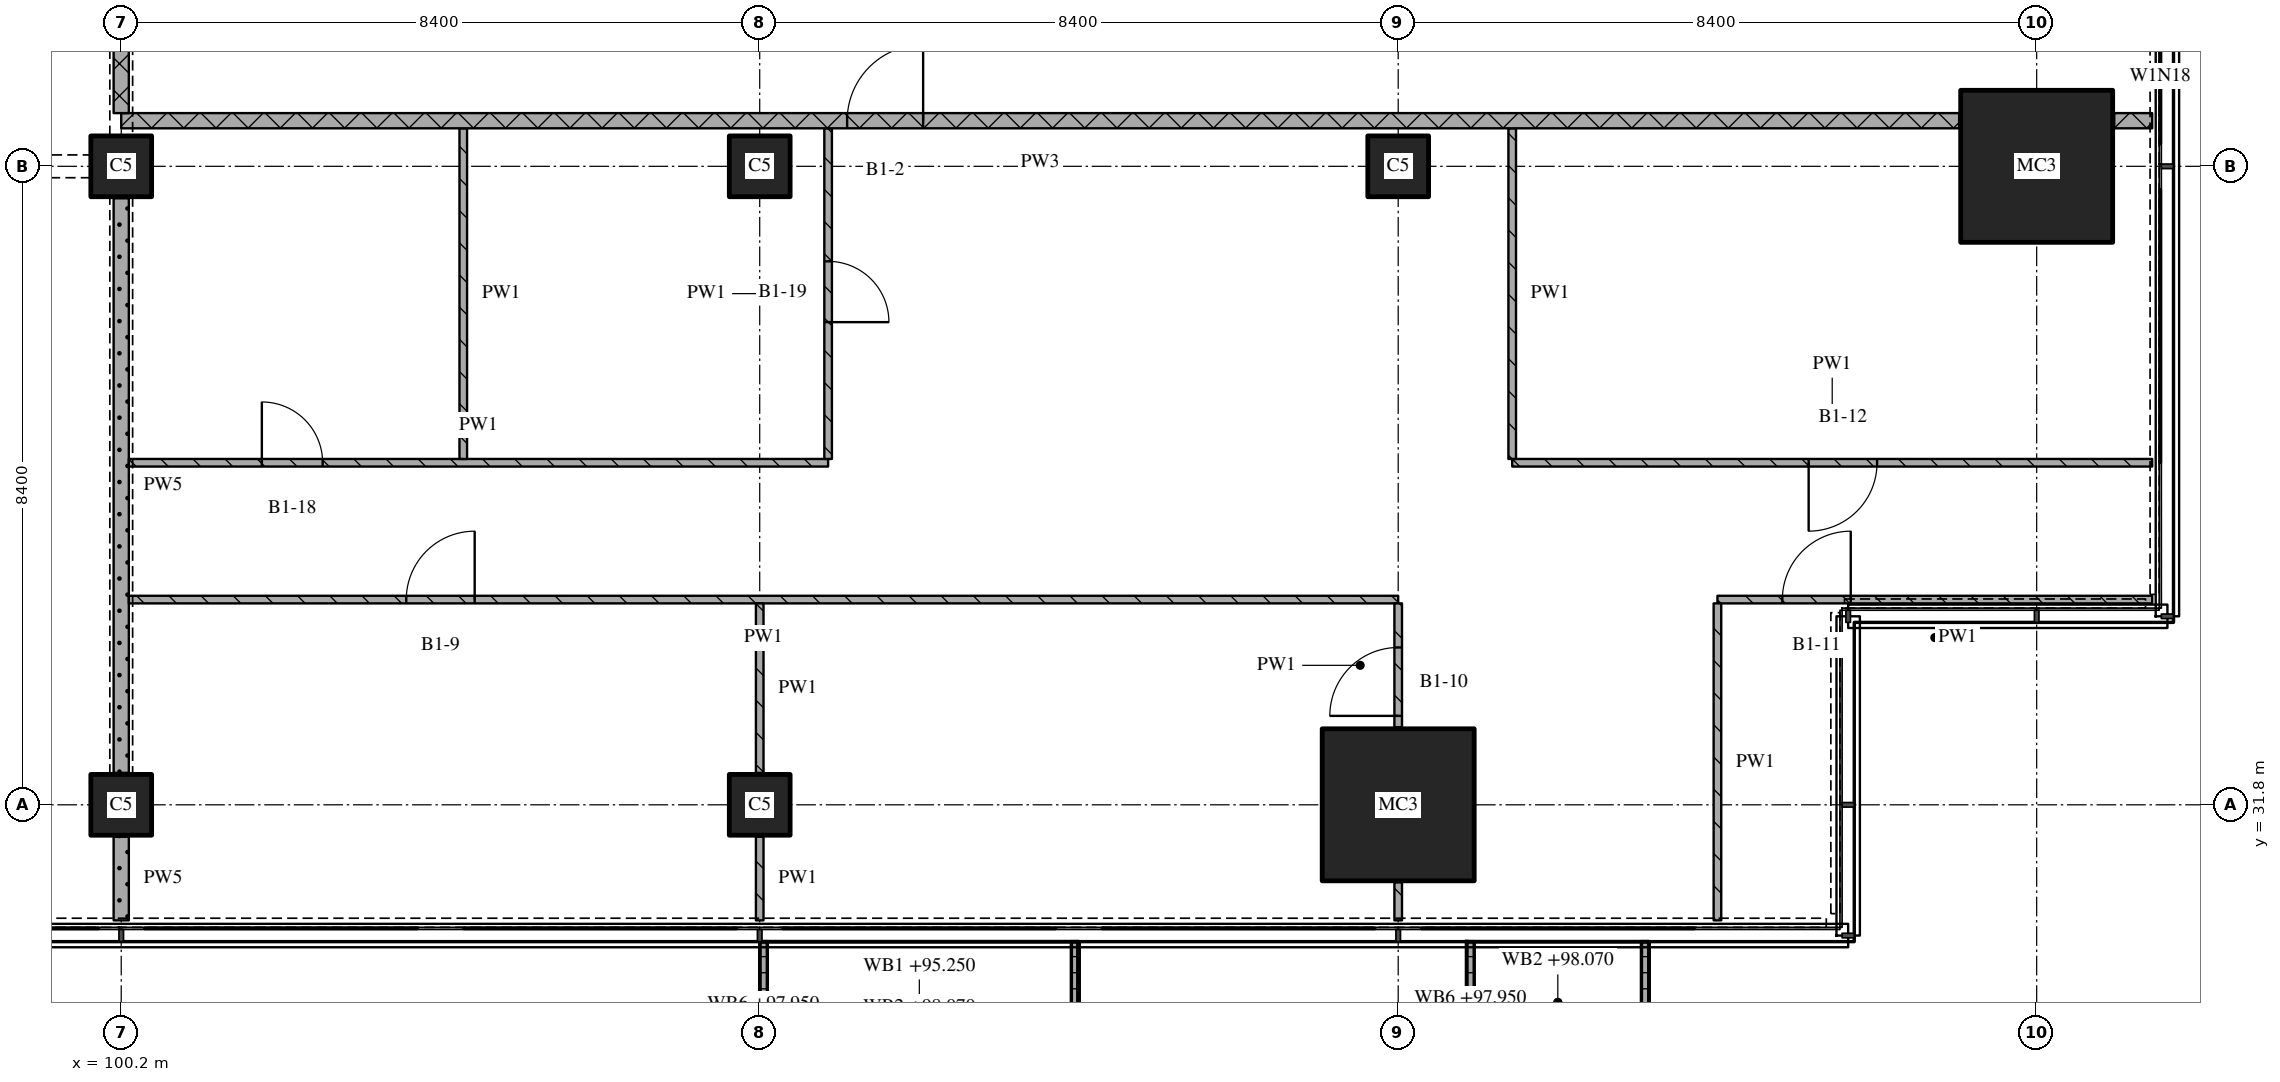
"""IFC4 building model, lengths in metres.
Left out: names, types, materials, properties, quantities, classifications, styles, units other than length and angle.
Written with IfcOpenShell. Run it as: python <this file> out.ifc"""

import sys

from ifc_helpers import new_model, si_unit, direction, frame, frame_2d, origin, origin_2d, place, context, subcontext, project, spatial, polyline, rectangle, outline, extrude, element, fill, save


model = new_model("IFC4")
c1 = context("Model", 3, precision=1e-05, world=origin(), true_north=direction((0.0, 1.0)))
c2 = subcontext(c1, "Body", "Model", "MODEL_VIEW")
j1 = project(units=[si_unit("LENGTHUNIT", "METRE"), si_unit("PLANEANGLEUNIT", "RADIAN")], contexts=[c1])
p1 = place(None, origin())
s1 = spatial("IfcSite", under=j1, at=p1, CompositionType="ELEMENT")
p2 = place(p1, origin())
s2 = spatial("IfcBuilding", under=s1, at=p2, CompositionType="ELEMENT")
p3 = place(p2, frame((0.0, 0.0, 95.25)))
s3 = spatial("IfcBuildingStorey", under=s2, at=p3, CompositionType="ELEMENT", Elevation=95.25)
for number, where, z_axis, x_axis in (
    (1, (100.2, 31.8, 0.0), (0.0, 0.0, 1.0), (1.0, 0.0, 0.0)),
    (2, (100.2, 40.2, 0.0), (0.0, 0.0, 1.0), (1.0, 0.0, 0.0)),
    (3, (108.6, 31.8, 0.0), (0.0, 0.0, 1.0), (1.0, 0.0, 0.0)),
    (4, (108.6, 40.2, 0.0), (0.0, 0.0, 1.0), (1.0, 0.0, 0.0)),
):
    element("IfcColumn", number, at=place(p3, frame(where, z_axis=z_axis, x_axis=x_axis)), inside=s3, PredefinedType="COLUMN", context=c2, shape_type="SweptSolid", body=[
        extrude(rectangle(XDim=0.8, YDim=0.8, at=origin_2d()), origin(), (0.0, 0.0, 1.0), 3.6),
    ])
p4 = place(p3, frame((117.0, 31.8, 0.0), z_axis=(0.0, 0.0, 1.0), x_axis=(1.0, 0.0, 0.0)))
e5 = element("IfcColumn", 5, at=p4, inside=s3, PredefinedType="COLUMN", context=c2, shape_type="SweptSolid", body=[
    extrude(rectangle(XDim=2.0, YDim=2.0, at=origin_2d()), origin(), (0.0, 0.0, 1.0), 3.6),
])
p5 = place(p3, frame((117.0, 40.2, 0.0), z_axis=(0.0, 0.0, 1.0), x_axis=(1.0, 0.0, 0.0)))
e6 = element("IfcColumn", 6, at=p5, inside=s3, PredefinedType="COLUMN", context=c2, shape_type="SweptSolid", body=[
    extrude(rectangle(XDim=0.8, YDim=0.8, at=origin_2d()), origin(), (0.0, 0.0, 1.0), 3.6),
])
p6 = place(p3, frame((125.4, 40.2, 0.0), z_axis=(0.0, 0.0, 1.0), x_axis=(1.0, 0.0, 0.0)))
e7 = element("IfcColumn", 7, at=p6, inside=s3, PredefinedType="COLUMN", context=c2, shape_type="SweptSolid", body=[
    extrude(rectangle(XDim=2.0, YDim=2.0, at=origin_2d()), origin(), (0.0, 0.0, 1.0), 3.6),
])
p7 = place(p3, origin())
e8 = element("IfcWall", 8, at=p7, inside=s3, PredefinedType="SOLIDWALL", context=c2, shape_type="SweptSolid", body=[
    extrude(outline(polyline([(108.6, 30.0), (108.7, 30.0), (108.7, 28.367), (112.7, 28.367), (112.7, 30.0), (112.8, 30.0), (112.8, 28.267), (108.6, 28.267), (108.6, 30.0)])), origin(), (0.0, 0.0, 1.0), 1.0),
])
p8 = place(p3, origin())
e9 = element("IfcWall", 9, at=p8, inside=s3, PredefinedType="SOLIDWALL", context=c2, shape_type="SweptSolid", body=[
    extrude(outline(polyline([(117.9, 30.0), (118.0, 30.0), (118.0, 28.5), (120.2, 28.5), (120.2, 30.0), (120.3, 30.0), (120.3, 28.4), (117.9, 28.4), (117.9, 30.0)])), origin(), (0.0, 0.0, 1.0), 1.0),
])
p9 = place(p3, frame((117.0, 34.5, 0.0), z_axis=(0.0, 0.0, 1.0), x_axis=(-1.0, 0.0, 0.0)))
e10 = element("IfcWall", 10, at=p9, inside=s3, PredefinedType="PARTITIONING", context=c2, shape_type="SweptSolid", body=[
    extrude(rectangle(XDim=16.7, YDim=0.1, at=frame_2d((8.35, 0.0))), origin(), (0.0, 0.0, 1.0), 3.32),
])
p10 = place(p9, frame((12.15, 0.0, 0.0)))
e11 = element("IfcOpeningElement", 11, at=p10, cuts=e10, PredefinedType="OPENING", context=c2, shape_type="SweptSolid", body=[
    extrude(rectangle(XDim=0.9, YDim=2.1, at=frame_2d((0.45, 1.05))), frame((0.0, 0.06, 0.0), z_axis=(0.0, -1.0, 0.0), x_axis=(1.0, 0.0, 0.0)), (0.0, 0.0, 1.0), 0.12),
])
p11 = place(p3, frame((126.92, 34.5, 0.0), z_axis=(0.0, 0.0, 1.0), x_axis=(-1.0, 0.0, 0.0)))
e12 = element("IfcWall", 12, at=p11, inside=s3, PredefinedType="PARTITIONING", context=c2, shape_type="SweptSolid", body=[
    extrude(rectangle(XDim=5.72, YDim=0.1, at=frame_2d((2.86, 0.0))), origin(), (0.0, 0.0, 1.0), 3.32),
])
p12 = place(p11, frame((3.966, 0.0, 0.0)))
e13 = element("IfcOpeningElement", 13, at=p12, cuts=e12, PredefinedType="OPENING", context=c2, shape_type="SweptSolid", body=[
    extrude(rectangle(XDim=0.9, YDim=2.1, at=frame_2d((0.45, 1.05))), frame((0.0, 0.06, 0.0), z_axis=(0.0, -1.0, 0.0), x_axis=(1.0, 0.0, 0.0)), (0.0, 0.0, 1.0), 0.12),
])
p13 = place(p3, frame((100.3, 36.3, 0.0), z_axis=(0.0, 0.0, 1.0), x_axis=(1.0, 0.0, 0.0)))
e14 = element("IfcWall", 14, at=p13, inside=s3, PredefinedType="PARTITIONING", context=c2, shape_type="SweptSolid", body=[
    extrude(rectangle(XDim=9.2, YDim=0.1, at=frame_2d((4.6, 0.0))), origin(), (0.0, 0.0, 1.0), 3.32),
])
p14 = place(p13, frame((1.75, 0.0, 0.0)))
e15 = element("IfcOpeningElement", 15, at=p14, cuts=e14, PredefinedType="OPENING", context=c2, shape_type="SweptSolid", body=[
    extrude(rectangle(XDim=0.8, YDim=2.1, at=frame_2d((0.4, 1.05))), frame((0.0, 0.06, 0.0), z_axis=(0.0, -1.0, 0.0), x_axis=(1.0, 0.0, 0.0)), (0.0, 0.0, 1.0), 0.12),
])
p15 = place(p3, frame((118.5, 36.3, 0.0), z_axis=(0.0, 0.0, 1.0), x_axis=(1.0, 0.0, 0.0)))
e16 = element("IfcWall", 16, at=p15, inside=s3, PredefinedType="PARTITIONING", context=c2, shape_type="SweptSolid", body=[
    extrude(rectangle(XDim=8.42, YDim=0.1, at=frame_2d((4.21, 0.0))), origin(), (0.0, 0.0, 1.0), 3.32),
])
p16 = place(p15, frame((3.9, 0.0, 0.0)))
e17 = element("IfcOpeningElement", 17, at=p16, cuts=e16, PredefinedType="OPENING", context=c2, shape_type="SweptSolid", body=[
    extrude(rectangle(XDim=0.9, YDim=2.1, at=frame_2d((0.45, 1.05))), frame((0.0, 0.06, 0.0), z_axis=(0.0, -1.0, 0.0), x_axis=(1.0, 0.0, 0.0)), (0.0, 0.0, 1.0), 0.12),
])
p17 = place(p3, frame((124.38, 40.8, 0.0), z_axis=(0.0, 0.0, 1.0), x_axis=(-1.0, 0.0, 0.0)))
e18 = element("IfcWall", 18, at=p17, inside=s3, PredefinedType="PARTITIONING", context=c2, shape_type="SweptSolid", body=[
    extrude(rectangle(XDim=24.18, YDim=0.2, at=frame_2d((12.09, 0.0))), origin(), (0.0, 0.0, 1.0), 3.32),
])
p18 = place(p17, frame((13.63, 0.0, 0.0)))
e19 = element("IfcOpeningElement", 19, at=p18, cuts=e18, PredefinedType="OPENING", context=c2, shape_type="SweptSolid", body=[
    extrude(rectangle(XDim=1.0, YDim=2.1, at=frame_2d((0.5, 1.05))), frame((0.0, 0.11, 0.0), z_axis=(0.0, -1.0, 0.0), x_axis=(1.0, 0.0, 0.0)), (0.0, 0.0, 1.0), 0.22),
])
p19 = place(p3, frame((126.42, 40.8, 0.0), z_axis=(0.0, 0.0, 1.0), x_axis=(1.0, 0.0, 0.0)))
e20 = element("IfcWall", 20, at=p19, inside=s3, PredefinedType="PARTITIONING", context=c2, shape_type="SweptSolid", body=[
    extrude(rectangle(XDim=0.5, YDim=0.2, at=frame_2d((0.25, 0.0))), origin(), (0.0, 0.0, 1.0), 3.32),
])
p20 = place(p3, frame((100.2, 43.1, 0.0), z_axis=(0.0, 0.0, 1.0), x_axis=(0.0, -1.0, 0.0)))
e21 = element("IfcWall", 21, at=p20, inside=s3, PredefinedType="PARTITIONING", context=c2, shape_type="SweptSolid", body=[
    extrude(rectangle(XDim=2.2, YDim=0.2, at=frame_2d((1.1, 0.0))), origin(), (0.0, 0.0, 1.0), 2.43),
])
p21 = place(p3, frame((100.2, 31.38, 0.0), z_axis=(0.0, 0.0, 1.0), x_axis=(0.0, -1.0, 0.0)))
e22 = element("IfcWall", 22, at=p21, inside=s3, PredefinedType="PARTITIONING", context=c2, shape_type="SweptSolid", body=[
    extrude(rectangle(XDim=1.1, YDim=0.2, at=frame_2d((0.55, 0.0))), origin(), (0.0, 0.0, 1.0), 3.32),
])
p22 = place(p3, frame((100.2, 39.78, 0.0), z_axis=(0.0, 0.0, 1.0), x_axis=(0.0, -1.0, 0.0)))
e23 = element("IfcWall", 23, at=p22, inside=s3, PredefinedType="PARTITIONING", context=c2, shape_type="SweptSolid", body=[
    extrude(rectangle(XDim=7.56, YDim=0.2, at=frame_2d((3.78, 0.0))), origin(), (0.0, 0.0, 1.0), 2.83),
])
p23 = place(p3, frame((104.7, 40.7, 0.0), z_axis=(0.0, 0.0, 1.0), x_axis=(0.0, -1.0, 0.0)))
e24 = element("IfcWall", 24, at=p23, inside=s3, PredefinedType="PARTITIONING", context=c2, shape_type="SweptSolid", body=[
    extrude(rectangle(XDim=4.35, YDim=0.1, at=frame_2d((2.175, 0.0))), origin(), (0.0, 0.0, 1.0), 3.32),
])
p24 = place(p3, frame((108.6, 31.38, 0.0), z_axis=(0.0, 0.0, 1.0), x_axis=(0.0, -1.0, 0.0)))
e25 = element("IfcWall", 25, at=p24, inside=s3, PredefinedType="PARTITIONING", context=c2, shape_type="SweptSolid", body=[
    extrude(rectangle(XDim=1.1, YDim=0.1, at=frame_2d((0.55, 0.0))), origin(), (0.0, 0.0, 1.0), 3.32),
])
p25 = place(p3, frame((108.6, 34.45, 0.0), z_axis=(0.0, 0.0, 1.0), x_axis=(0.0, -1.0, 0.0)))
e26 = element("IfcWall", 26, at=p25, inside=s3, PredefinedType="PARTITIONING", context=c2, shape_type="SweptSolid", body=[
    extrude(rectangle(XDim=2.23, YDim=0.1, at=frame_2d((1.115, 0.0))), origin(), (0.0, 0.0, 1.0), 3.32),
])
p26 = place(p3, frame((109.5, 36.35, 0.0), z_axis=(0.0, 0.0, 1.0), x_axis=(0.0, 1.0, 0.0)))
e27 = element("IfcWall", 27, at=p26, inside=s3, PredefinedType="PARTITIONING", context=c2, shape_type="SweptSolid", body=[
    extrude(rectangle(XDim=4.35, YDim=0.1, at=frame_2d((2.175, 0.0))), origin(), (0.0, 0.0, 1.0), 3.32),
])
p27 = place(p26, frame((1.8, 0.0, 0.0)))
e28 = element("IfcOpeningElement", 28, at=p27, cuts=e27, PredefinedType="OPENING", context=c2, shape_type="SweptSolid", body=[
    extrude(rectangle(XDim=0.8, YDim=2.1, at=frame_2d((0.4, 1.05))), frame((0.0, 0.06, 0.0), z_axis=(0.0, -1.0, 0.0), x_axis=(1.0, 0.0, 0.0)), (0.0, 0.0, 1.0), 0.12),
])
p28 = place(p3, frame((117.0, 30.78, 0.0), z_axis=(0.0, 0.0, 1.0), x_axis=(0.0, -1.0, 0.0)))
e29 = element("IfcWall", 29, at=p28, inside=s3, PredefinedType="PARTITIONING", context=c2, shape_type="SweptSolid", body=[
    extrude(rectangle(XDim=0.5, YDim=0.1, at=frame_2d((0.25, 0.0))), origin(), (0.0, 0.0, 1.0), 3.32),
])
p29 = place(p3, frame((117.0, 32.82, 0.0), z_axis=(0.0, 0.0, 1.0), x_axis=(0.0, 1.0, 0.0)))
e30 = element("IfcWall", 30, at=p29, inside=s3, PredefinedType="PARTITIONING", context=c2, shape_type="SweptSolid", body=[
    extrude(rectangle(XDim=1.63, YDim=0.1, at=frame_2d((0.815, 0.0))), origin(), (0.0, 0.0, 1.0), 3.32),
])
p30 = place(p29, frame((0.15, 0.0, 0.0)))
e31 = element("IfcOpeningElement", 31, at=p30, cuts=e30, PredefinedType="OPENING", context=c2, shape_type="SweptSolid", body=[
    extrude(rectangle(XDim=0.9, YDim=2.1, at=frame_2d((0.45, 1.05))), frame((0.0, 0.06, 0.0), z_axis=(0.0, -1.0, 0.0), x_axis=(1.0, 0.0, 0.0)), (0.0, 0.0, 1.0), 0.12),
])
p31 = place(p3, frame((118.5, 40.7, 0.0), z_axis=(0.0, 0.0, 1.0), x_axis=(0.0, -1.0, 0.0)))
e32 = element("IfcWall", 32, at=p31, inside=s3, PredefinedType="PARTITIONING", context=c2, shape_type="SweptSolid", body=[
    extrude(rectangle(XDim=4.35, YDim=0.1, at=frame_2d((2.175, 0.0))), origin(), (0.0, 0.0, 1.0), 3.32),
])
p32 = place(p3, frame((121.2, 34.45, 0.0), z_axis=(0.0, 0.0, 1.0), x_axis=(0.0, -1.0, 0.0)))
e33 = element("IfcWall", 33, at=p32, inside=s3, PredefinedType="PARTITIONING", context=c2, shape_type="SweptSolid", body=[
    extrude(rectangle(XDim=4.17, YDim=0.1, at=frame_2d((2.085, 0.0))), origin(), (0.0, 0.0, 1.0), 3.32),
])
p33 = place(p10, origin())
e34 = element("IfcDoor", 34, at=p33, inside=s3, OperationType="SINGLE_SWING_RIGHT", PredefinedType="DOOR", context=c2, shape_type="SweptSolid", body=[
    extrude(rectangle(XDim=0.9, YDim=2.1, at=frame_2d((0.45, 1.05))), frame((0.0, 0.025, 0.0), z_axis=(0.0, -1.0, 0.0), x_axis=(1.0, 0.0, 0.0)), (0.0, 0.0, 1.0), 0.05),
])
fill(e11, e34)
p34 = place(p12, origin())
e35 = element("IfcDoor", 35, at=p34, inside=s3, OperationType="SINGLE_SWING_RIGHT", PredefinedType="DOOR", context=c2, shape_type="SweptSolid", body=[
    extrude(rectangle(XDim=0.9, YDim=2.1, at=frame_2d((0.45, 1.05))), frame((0.0, 0.025, 0.0), z_axis=(0.0, -1.0, 0.0), x_axis=(1.0, 0.0, 0.0)), (0.0, 0.0, 1.0), 0.05),
])
fill(e13, e35)
p35 = place(p14, origin())
e36 = element("IfcDoor", 36, at=p35, inside=s3, OperationType="SINGLE_SWING_LEFT", PredefinedType="DOOR", context=c2, shape_type="SweptSolid", body=[
    extrude(rectangle(XDim=0.8, YDim=2.1, at=frame_2d((0.4, 1.05))), frame((0.0, 0.025, 0.0), z_axis=(0.0, -1.0, 0.0), x_axis=(1.0, 0.0, 0.0)), (0.0, 0.0, 1.0), 0.05),
])
fill(e15, e36)
p36 = place(p16, origin())
e37 = element("IfcDoor", 37, at=p36, inside=s3, OperationType="SINGLE_SWING_RIGHT", PredefinedType="DOOR", context=c2, shape_type="SweptSolid", body=[
    extrude(rectangle(XDim=0.9, YDim=2.1, at=frame_2d((0.45, 1.05))), frame((0.0, 0.025, 0.0), z_axis=(0.0, -1.0, 0.0), x_axis=(1.0, 0.0, 0.0)), (0.0, 0.0, 1.0), 0.05),
])
fill(e17, e37)
p37 = place(p18, origin())
e38 = element("IfcDoor", 38, at=p37, inside=s3, OperationType="SINGLE_SWING_RIGHT", PredefinedType="DOOR", context=c2, shape_type="SweptSolid", body=[
    extrude(rectangle(XDim=1.0, YDim=2.1, at=frame_2d((0.5, 1.05))), frame((0.0, 0.025, 0.0), z_axis=(0.0, -1.0, 0.0), x_axis=(1.0, 0.0, 0.0)), (0.0, 0.0, 1.0), 0.05),
])
fill(e19, e38)
p38 = place(p27, origin())
e39 = element("IfcDoor", 39, at=p38, inside=s3, OperationType="SINGLE_SWING_RIGHT", PredefinedType="DOOR", context=c2, shape_type="SweptSolid", body=[
    extrude(rectangle(XDim=0.8, YDim=2.1, at=frame_2d((0.4, 1.05))), frame((0.0, 0.025, 0.0), z_axis=(0.0, -1.0, 0.0), x_axis=(1.0, 0.0, 0.0)), (0.0, 0.0, 1.0), 0.05),
])
fill(e28, e39)
p39 = place(p30, origin())
e40 = element("IfcDoor", 40, at=p39, inside=s3, OperationType="SINGLE_SWING_LEFT", PredefinedType="DOOR", context=c2, shape_type="SweptSolid", body=[
    extrude(rectangle(XDim=0.9, YDim=2.1, at=frame_2d((0.45, 1.05))), frame((0.0, 0.025, 0.0), z_axis=(0.0, -1.0, 0.0), x_axis=(1.0, 0.0, 0.0)), (0.0, 0.0, 1.0), 0.05),
])
fill(e31, e40)
save(model, sys.argv[1])
